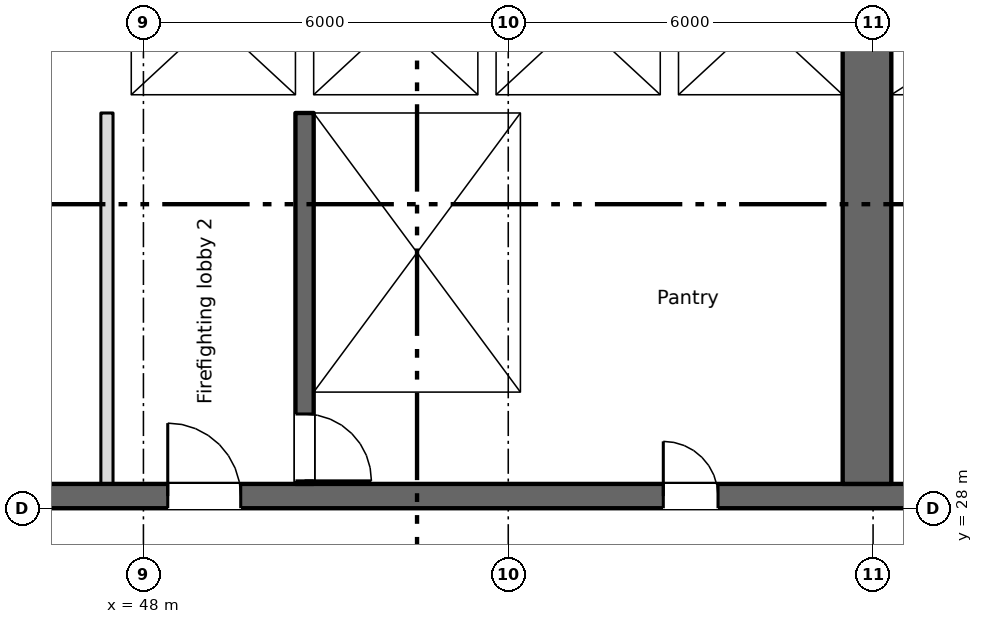
"""IFC4 building model, lengths in metres.
Left out: names, types, materials, properties, quantities, classifications, styles, units other than length and angle.
Written with IfcOpenShell. Run it as: python <this file> out.ifc"""

import sys

from ifc_helpers import new_model, si_unit, direction, frame, frame_2d, origin, place, context, subcontext, project, spatial, rectangle, extrude, element, fill, save


model = new_model("IFC4")
c1 = context("Model", 3, precision=1e-05, world=origin(), true_north=direction((0.0, 1.0)))
c2 = subcontext(c1, "Body", "Model", "MODEL_VIEW")
j1 = project(units=[si_unit("LENGTHUNIT", "METRE"), si_unit("PLANEANGLEUNIT", "RADIAN")], contexts=[c1])
p1 = place(None, origin())
s1 = spatial("IfcSite", under=j1, at=p1, CompositionType="ELEMENT")
p2 = place(p1, origin())
s2 = spatial("IfcBuilding", under=s1, at=p2, CompositionType="ELEMENT")
p3 = place(p2, frame((0.0, 0.0, 113.75)))
s3 = spatial("IfcBuildingStorey", under=s2, at=p3, CompositionType="ELEMENT", Elevation=113.75)
p4 = place(p3, frame((6.7, 28.2, 0.0), z_axis=(0.0, 0.0, 1.0), x_axis=(1.0, 0.0, 0.0)))
e1 = element("IfcWall", 1, at=p4, inside=s3, PredefinedType="SHEAR", context=c2, shape_type="SweptSolid", body=[
    extrude(rectangle(XDim=57.8, YDim=0.4, at=frame_2d((28.9, 0.0))), origin(), (0.0, 0.0, 1.0), 3.35),
])
p5 = place(p4, frame((12.562, 0.0, 0.0)))
e2 = element("IfcOpeningElement", 2, at=p5, cuts=e1, PredefinedType="OPENING", context=c2, shape_type="SweptSolid", body=[
    extrude(rectangle(XDim=0.9, YDim=2.1, at=frame_2d((0.45, 1.05))), frame((0.0, 0.21, 0.0), z_axis=(0.0, -1.0, 0.0), x_axis=(1.0, 0.0, 0.0)), (0.0, 0.0, 1.0), 0.42),
])
p6 = place(p4, frame((15.137, 0.0, 0.0)))
e3 = element("IfcOpeningElement", 3, at=p6, cuts=e1, PredefinedType="OPENING", context=c2, shape_type="SweptSolid", body=[
    extrude(rectangle(XDim=0.9, YDim=2.1, at=frame_2d((0.45, 1.05))), frame((0.0, 0.21, 0.0), z_axis=(0.0, -1.0, 0.0), x_axis=(1.0, 0.0, 0.0)), (0.0, 0.0, 1.0), 0.42),
])
p7 = place(p4, frame((49.85, 0.0, 0.0)))
e4 = element("IfcOpeningElement", 4, at=p7, cuts=e1, PredefinedType="OPENING", context=c2, shape_type="SweptSolid", body=[
    extrude(rectangle(XDim=0.9, YDim=2.1, at=frame_2d((0.45, 1.05))), frame((0.0, 0.21, 0.0), z_axis=(0.0, -1.0, 0.0), x_axis=(1.0, 0.0, 0.0)), (0.0, 0.0, 1.0), 0.42),
])
p8 = place(p4, frame((0.562, 0.0, 0.0)))
e5 = element("IfcOpeningElement", 5, at=p8, cuts=e1, PredefinedType="OPENING", context=c2, shape_type="SweptSolid", body=[
    extrude(rectangle(XDim=0.9, YDim=2.1, at=frame_2d((0.45, 1.05))), frame((0.0, 0.21, 0.0), z_axis=(0.0, -1.0, 0.0), x_axis=(1.0, 0.0, 0.0)), (0.0, 0.0, 1.0), 0.42),
])
p9 = place(p4, frame((2.137, 0.0, 0.0)))
e6 = element("IfcOpeningElement", 6, at=p9, cuts=e1, PredefinedType="OPENING", context=c2, shape_type="SweptSolid", body=[
    extrude(rectangle(XDim=0.9, YDim=2.1, at=frame_2d((0.45, 1.05))), frame((0.0, 0.21, 0.0), z_axis=(0.0, -1.0, 0.0), x_axis=(1.0, 0.0, 0.0)), (0.0, 0.0, 1.0), 0.42),
])
p10 = place(p4, frame((4.7, 0.0, 0.0)))
e7 = element("IfcOpeningElement", 7, at=p10, cuts=e1, PredefinedType="OPENING", context=c2, shape_type="SweptSolid", body=[
    extrude(rectangle(XDim=1.2, YDim=2.1, at=frame_2d((0.6, 1.05))), frame((0.0, 0.21, 0.0), z_axis=(0.0, -1.0, 0.0), x_axis=(1.0, 0.0, 0.0)), (0.0, 0.0, 1.0), 0.42),
])
p11 = place(p4, frame((31.7, 0.0, 0.0)))
e8 = element("IfcOpeningElement", 8, at=p11, cuts=e1, PredefinedType="OPENING", context=c2, shape_type="SweptSolid", body=[
    extrude(rectangle(XDim=1.2, YDim=2.1, at=frame_2d((0.6, 1.05))), frame((0.0, 0.21, 0.0), z_axis=(0.0, -1.0, 0.0), x_axis=(1.0, 0.0, 0.0)), (0.0, 0.0, 1.0), 0.42),
])
p12 = place(p4, frame((55.2, 0.0, 0.0)))
e9 = element("IfcOpeningElement", 9, at=p12, cuts=e1, PredefinedType="OPENING", context=c2, shape_type="SweptSolid", body=[
    extrude(rectangle(XDim=1.2, YDim=2.1, at=frame_2d((0.6, 1.05))), frame((0.0, 0.21, 0.0), z_axis=(0.0, -1.0, 0.0), x_axis=(1.0, 0.0, 0.0)), (0.0, 0.0, 1.0), 0.42),
])
p13 = place(p4, frame((21.7, 0.0, 0.0)))
e10 = element("IfcOpeningElement", 10, at=p13, cuts=e1, PredefinedType="OPENING", context=c2, shape_type="SweptSolid", body=[
    extrude(rectangle(XDim=1.2, YDim=2.1, at=frame_2d((0.6, 1.05))), frame((0.0, 0.21, 0.0), z_axis=(0.0, -1.0, 0.0), x_axis=(1.0, 0.0, 0.0)), (0.0, 0.0, 1.0), 0.42),
])
p14 = place(p4, frame((41.7, 0.0, 0.0)))
e11 = element("IfcOpeningElement", 11, at=p14, cuts=e1, PredefinedType="OPENING", context=c2, shape_type="SweptSolid", body=[
    extrude(rectangle(XDim=1.2, YDim=2.1, at=frame_2d((0.6, 1.05))), frame((0.0, 0.21, 0.0), z_axis=(0.0, -1.0, 0.0), x_axis=(1.0, 0.0, 0.0)), (0.0, 0.0, 1.0), 0.42),
])
p15 = place(p4, frame((24.85, 0.0, 0.0)))
e12 = element("IfcOpeningElement", 12, at=p15, cuts=e1, PredefinedType="OPENING", context=c2, shape_type="SweptSolid", body=[
    extrude(rectangle(XDim=2.4, YDim=2.1, at=frame_2d((1.2, 1.05))), frame((0.0, 0.21, 0.0), z_axis=(0.0, -1.0, 0.0), x_axis=(1.0, 0.0, 0.0)), (0.0, 0.0, 1.0), 0.42),
])
p16 = place(p4, frame((37.35, 0.0, 0.0)))
e13 = element("IfcOpeningElement", 13, at=p16, cuts=e1, PredefinedType="OPENING", context=c2, shape_type="SweptSolid", body=[
    extrude(rectangle(XDim=2.4, YDim=2.1, at=frame_2d((1.2, 1.05))), frame((0.0, 0.21, 0.0), z_axis=(0.0, -1.0, 0.0), x_axis=(1.0, 0.0, 0.0)), (0.0, 0.0, 1.0), 0.42),
])
p17 = place(p4, frame((7.95, 0.0, 0.0)))
e14 = element("IfcOpeningElement", 14, at=p17, cuts=e1, PredefinedType="OPENING", context=c2, shape_type="SweptSolid", body=[
    extrude(rectangle(XDim=2.4, YDim=2.1, at=frame_2d((1.2, 1.05))), frame((0.0, 0.21, 0.0), z_axis=(0.0, -1.0, 0.0), x_axis=(1.0, 0.0, 0.0)), (0.0, 0.0, 1.0), 0.42),
])
p18 = place(p4, frame((28.85, 0.0, 0.0)))
e15 = element("IfcOpeningElement", 15, at=p18, cuts=e1, PredefinedType="OPENING", context=c2, shape_type="SweptSolid", body=[
    extrude(rectangle(XDim=0.9, YDim=2.1, at=frame_2d((0.45, 1.05))), frame((0.0, 0.21, 0.0), z_axis=(0.0, -1.0, 0.0), x_axis=(1.0, 0.0, 0.0)), (0.0, 0.0, 1.0), 0.42),
])
p19 = place(p4, frame((34.85, 0.0, 0.0)))
e16 = element("IfcOpeningElement", 16, at=p19, cuts=e1, PredefinedType="OPENING", context=c2, shape_type="SweptSolid", body=[
    extrude(rectangle(XDim=0.9, YDim=2.1, at=frame_2d((0.45, 1.05))), frame((0.0, 0.21, 0.0), z_axis=(0.0, -1.0, 0.0), x_axis=(1.0, 0.0, 0.0)), (0.0, 0.0, 1.0), 0.42),
])
p20 = place(p3, frame((59.9, 28.4, 0.0), z_axis=(0.0, 0.0, 1.0), x_axis=(0.0, 1.0, 0.0)))
e17 = element("IfcWall", 17, at=p20, inside=s3, PredefinedType="SHEAR", context=c2, shape_type="SweptSolid", body=[
    extrude(rectangle(XDim=16.8, YDim=0.8, at=frame_2d((8.4, 0.0))), origin(), (0.0, 0.0, 1.0), 3.35),
])
p21 = place(p20, frame((9.6, 0.0, 0.0)))
e18 = element("IfcOpeningElement", 18, at=p21, cuts=e17, PredefinedType="OPENING", context=c2, shape_type="SweptSolid", body=[
    extrude(rectangle(XDim=2.0, YDim=2.1, at=frame_2d((1.0, 1.05))), frame((0.0, 0.41, 0.0), z_axis=(0.0, -1.0, 0.0), x_axis=(1.0, 0.0, 0.0)), (0.0, 0.0, 1.0), 0.82),
])
p22 = place(p20, frame((15.35, 0.0, 0.0)))
e19 = element("IfcOpeningElement", 19, at=p22, cuts=e17, PredefinedType="OPENING", context=c2, shape_type="SweptSolid", body=[
    extrude(rectangle(XDim=1.2, YDim=2.1, at=frame_2d((0.6, 1.05))), frame((0.0, 0.41, 0.0), z_axis=(0.0, -1.0, 0.0), x_axis=(1.0, 0.0, 0.0)), (0.0, 0.0, 1.0), 0.82),
])
p23 = place(p3, frame((50.65, 34.5, 0.0), z_axis=(0.0, 0.0, 1.0), x_axis=(0.0, -1.0, 0.0)))
e20 = element("IfcWall", 20, at=p23, inside=s3, PredefinedType="SHEAR", context=c2, shape_type="SweptSolid", body=[
    extrude(rectangle(XDim=6.1, YDim=0.3, at=frame_2d((3.05, 0.0))), origin(), (0.0, 0.0, 1.0), 3.35),
])
p24 = place(p23, frame((4.95, 0.0, 0.0)))
e21 = element("IfcOpeningElement", 21, at=p24, cuts=e20, PredefinedType="OPENING", context=c2, shape_type="SweptSolid", body=[
    extrude(rectangle(XDim=1.1, YDim=2.1, at=frame_2d((0.55, 1.05))), frame((0.0, 0.16, 0.0), z_axis=(0.0, -1.0, 0.0), x_axis=(1.0, 0.0, 0.0)), (0.0, 0.0, 1.0), 0.32),
])
p25 = place(p3, frame((54.35, 28.4, 0.0), z_axis=(0.0, 0.0, 1.0), x_axis=(0.0, 1.0, 0.0)))
e22 = element("IfcWall", 22, at=p25, inside=s3, PredefinedType="SHEAR", context=c2, shape_type="SweptSolid", body=[
    extrude(rectangle(XDim=6.1, YDim=0.3, at=frame_2d((3.05, 0.0))), origin(), (0.0, 0.0, 1.0), 3.35),
])
p26 = place(p3, frame((60.55, 28.4, 0.0), z_axis=(0.0, 0.0, 1.0), x_axis=(0.0, 1.0, 0.0)))
e23 = element("IfcWall", 23, at=p26, inside=s3, PredefinedType="SHEAR", context=c2, shape_type="SweptSolid", body=[
    extrude(rectangle(XDim=6.1, YDim=0.5, at=frame_2d((3.05, 0.0))), origin(), (0.0, 0.0, 1.0), 3.35),
])
p27 = place(p3, frame((47.3, 34.65, 0.0), z_axis=(0.0, 0.0, 1.0), x_axis=(1.0, 0.0, 0.0)))
e24 = element("IfcWall", 24, at=p27, inside=s3, PredefinedType="SHEAR", context=c2, shape_type="SweptSolid", body=[
    extrude(rectangle(XDim=12.2, YDim=0.3, at=frame_2d((6.1, 0.0))), origin(), (0.0, 0.0, 1.0), 3.35),
])
p28 = place(p27, frame((1.3, 0.0, 0.0)))
e25 = element("IfcOpeningElement", 25, at=p28, cuts=e24, PredefinedType="OPENING", context=c2, shape_type="SweptSolid", body=[
    extrude(rectangle(XDim=1.1, YDim=2.1, at=frame_2d((0.55, 1.05))), frame((0.0, 0.16, 0.0), z_axis=(0.0, -1.0, 0.0), x_axis=(1.0, 0.0, 0.0)), (0.0, 0.0, 1.0), 0.32),
])
p29 = place(p3, frame((60.3, 34.65, 0.0), z_axis=(0.0, 0.0, 1.0), x_axis=(1.0, 0.0, 0.0)))
e26 = element("IfcWall", 26, at=p29, inside=s3, PredefinedType="SHEAR", context=c2, shape_type="SweptSolid", body=[
    extrude(rectangle(XDim=4.2, YDim=0.3, at=frame_2d((2.1, 0.0))), origin(), (0.0, 0.0, 1.0), 3.35),
])
p30 = place(p3, frame((47.55, 34.8, 0.0), z_axis=(0.0, 0.0, 1.0), x_axis=(0.0, 1.0, 0.0)))
e27 = element("IfcWall", 27, at=p30, inside=s3, PredefinedType="SHEAR", context=c2, shape_type="SweptSolid", body=[
    extrude(rectangle(XDim=2.5, YDim=0.5, at=frame_2d((1.25, 0.0))), origin(), (0.0, 0.0, 1.0), 3.35),
])
for number, where, z_axis, x_axis in (
    (28, (50.65, 34.8, 0.0), (0.0, 0.0, 1.0), (0.0, 1.0, 0.0)),
    (29, (53.65, 34.8, 0.0), (0.0, 0.0, 1.0), (0.0, 1.0, 0.0)),
    (30, (56.65, 34.8, 0.0), (0.0, 0.0, 1.0), (0.0, 1.0, 0.0)),
):
    element("IfcWall", number, at=place(p3, frame(where, z_axis=z_axis, x_axis=x_axis)), inside=s3, PredefinedType="SHEAR", context=c2, shape_type="SweptSolid", body=[
        extrude(rectangle(XDim=2.5, YDim=0.3, at=frame_2d((1.25, 0.0))), origin(), (0.0, 0.0, 1.0), 3.35),
    ])
p31 = place(p3, frame((47.4, 28.4, 0.0), z_axis=(0.0, 0.0, 1.0), x_axis=(0.0, 1.0, 0.0)))
e31 = element("IfcWall", 31, at=p31, inside=s3, PredefinedType="PARTITIONING", context=c2, shape_type="SweptSolid", body=[
    extrude(rectangle(XDim=6.1, YDim=0.2, at=frame_2d((3.05, 0.0))), origin(), (0.0, 0.0, 1.0), 3.35),
])
p32 = place(p7, origin())
e32 = element("IfcDoor", 32, at=p32, inside=s3, OperationType="SINGLE_SWING_LEFT", PredefinedType="DOOR", context=c2, shape_type="SweptSolid", body=[
    extrude(rectangle(XDim=0.9, YDim=2.1, at=frame_2d((0.45, 1.05))), frame((0.0, 0.025, 0.0), z_axis=(0.0, -1.0, 0.0), x_axis=(1.0, 0.0, 0.0)), (0.0, 0.0, 1.0), 0.05),
])
fill(e4, e32)
p33 = place(p28, origin())
e33 = element("IfcDoor", 33, at=p33, inside=s3, OperationType="SLIDING_TO_LEFT", PredefinedType="DOOR", context=c2, shape_type="SweptSolid", body=[
    extrude(rectangle(XDim=1.1, YDim=2.1, at=frame_2d((0.55, 1.05))), frame((0.0, 0.025, 0.0), z_axis=(0.0, -1.0, 0.0), x_axis=(1.0, 0.0, 0.0)), (0.0, 0.0, 1.0), 0.05),
])
fill(e25, e33)
p34 = place(p24, origin())
e34 = element("IfcDoor", 34, at=p34, inside=s3, OperationType="SINGLE_SWING_RIGHT", PredefinedType="DOOR", context=c2, shape_type="SweptSolid", body=[
    extrude(rectangle(XDim=1.1, YDim=2.1, at=frame_2d((0.55, 1.05))), frame((0.0, 0.025, 0.0), z_axis=(0.0, -1.0, 0.0), x_axis=(1.0, 0.0, 0.0)), (0.0, 0.0, 1.0), 0.05),
])
fill(e21, e34)
p35 = place(p14, origin())
e35 = element("IfcDoor", 35, at=p35, inside=s3, OperationType="SINGLE_SWING_LEFT", PredefinedType="DOOR", context=c2, shape_type="SweptSolid", body=[
    extrude(rectangle(XDim=1.2, YDim=2.1, at=frame_2d((0.6, 1.05))), frame((0.0, 0.025, 0.0), z_axis=(0.0, -1.0, 0.0), x_axis=(1.0, 0.0, 0.0)), (0.0, 0.0, 1.0), 0.05),
])
fill(e11, e35)
save(model, sys.argv[1])
